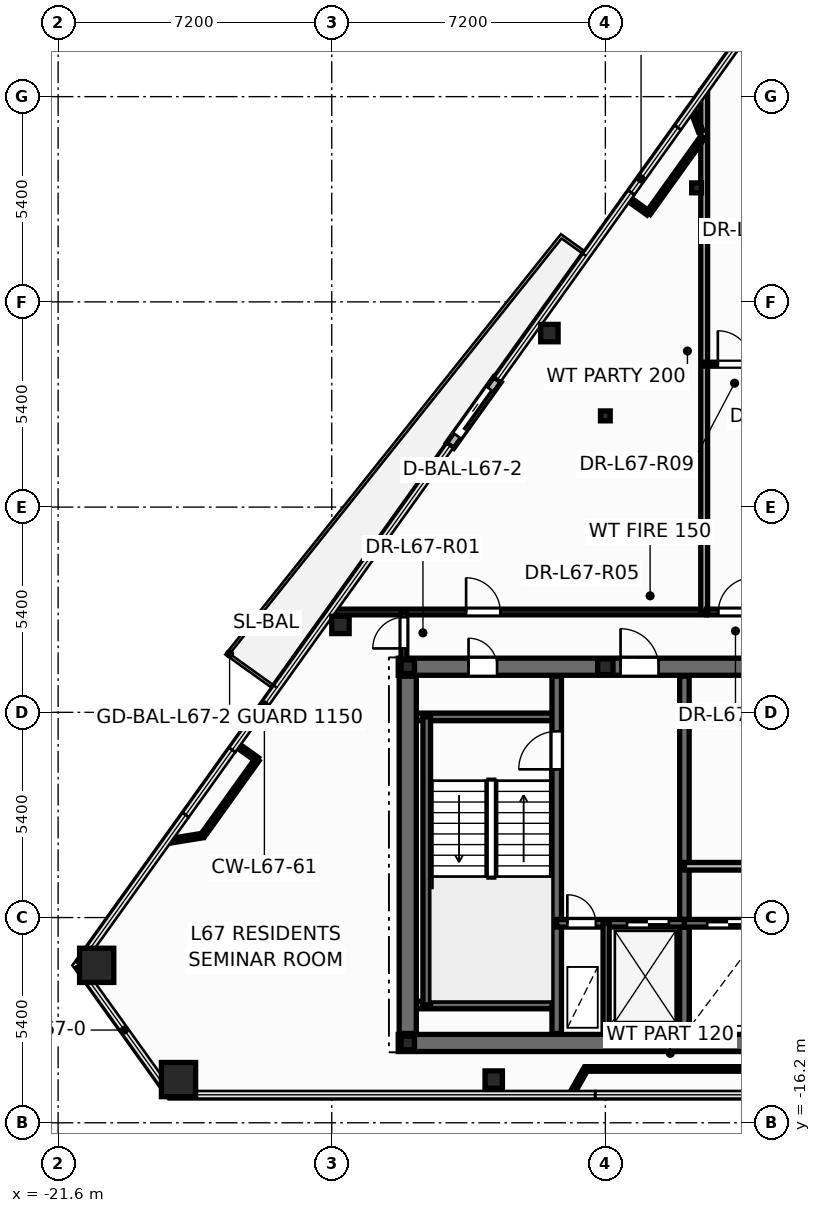
"""IFC4 building model, lengths in metres.
Left out: names, types, materials, properties, quantities, classifications, styles, units other than length and angle.
Written with IfcOpenShell. Run it as: python <this file> out.ifc"""

import sys

from ifc_helpers import new_model, si_unit, direction, frame, frame_2d, origin, origin_2d, place, context, subcontext, project, spatial, rectangle, hollow_rectangle, hollow_circle, i_section, extrude, element, fill, save


model = new_model("IFC4")
c1 = context("Model", 3, precision=1e-05, world=origin(), true_north=direction((0.0, 1.0)))
c2 = subcontext(c1, "Body", "Model", "MODEL_VIEW")
j1 = project(units=[si_unit("LENGTHUNIT", "METRE"), si_unit("PLANEANGLEUNIT", "RADIAN")], contexts=[c1])
p1 = place(None, origin())
s1 = spatial("IfcSite", under=j1, at=p1, CompositionType="ELEMENT")
p2 = place(p1, origin())
s2 = spatial("IfcBuilding", under=s1, at=p2, CompositionType="ELEMENT")
p3 = place(p2, frame((0.0, 0.0, 256.2)))
s3 = spatial("IfcBuildingStorey", under=s2, at=p3, CompositionType="ELEMENT", Elevation=256.2)
for number, where, z_axis, x_axis in (
    (1, (-20.585, -12.057, 0.0), (0.0, 0.0, 1.0), (1.0, 0.0, 0.0)),
    (2, (-18.432, -15.063, 0.0), (0.0, 0.0, 1.0), (1.0, 0.0, 0.0)),
):
    element("IfcColumn", number, at=place(p3, frame(where, z_axis=z_axis, x_axis=x_axis)), inside=s3, PredefinedType="COLUMN", context=c2, shape_type="SweptSolid", body=[
        extrude(hollow_rectangle(XDim=0.9, YDim=0.9, WallThickness=0.04, at=origin_2d()), origin(), (0.0, 0.0, 1.0), 3.6),
    ])
for number, where, z_axis, x_axis in (
    (3, (-10.138, -15.063, 0.0), (0.0, 0.0, 1.0), (1.0, 0.0, 0.0)),
    (4, (-8.673, 4.579, 0.0), (0.0, 0.0, 1.0), (1.0, 0.0, 0.0)),
    (5, (-14.171, -3.099, 0.0), (0.0, 0.0, 1.0), (1.0, 0.0, 0.0)),
):
    element("IfcColumn", number, at=place(p3, frame(where, z_axis=z_axis, x_axis=x_axis)), inside=s3, PredefinedType="COLUMN", context=c2, shape_type="SweptSolid", body=[
        extrude(hollow_circle(Radius=0.229, WallThickness=0.016, at=origin_2d()), origin(), (0.0, 0.0, 1.0), 3.6),
    ])
for number, where, z_axis, x_axis in (
    (6, (-12.4, -14.1, 0.0), (0.0, 0.0, 1.0), (1.0, 0.0, 0.0)),
    (7, (-12.4, -4.2, 0.0), (0.0, 0.0, 1.0), (1.0, 0.0, 0.0)),
):
    element("IfcColumn", number, at=place(p3, frame(where, z_axis=z_axis, x_axis=x_axis)), inside=s3, PredefinedType="COLUMN", context=c2, shape_type="SweptSolid", body=[
        extrude(i_section(OverallWidth=0.352, OverallDepth=0.359, WebThickness=0.018, FlangeThickness=0.026, at=origin_2d()), origin(), (0.0, 0.0, 1.0), 3.6),
    ])
p4 = place(p3, frame((-7.2, -4.2, 0.0), z_axis=(0.0, 0.0, 1.0), x_axis=(1.0, 0.0, 0.0)))
e8 = element("IfcColumn", 8, at=p4, inside=s3, PredefinedType="PILASTER", context=c2, shape_type="SweptSolid", body=[
    extrude(i_section(OverallWidth=0.405, OverallDepth=0.414, WebThickness=0.022, FlangeThickness=0.032, at=origin_2d()), origin(), (0.0, 0.0, 1.0), 3.6),
])
for number, where, z_axis, x_axis in (
    (9, (-7.2, 2.4, 0.0), (0.0, 0.0, 1.0), (1.0, 0.0, 0.0)),
    (10, (-4.8, 8.4, 0.0), (0.0, 0.0, 1.0), (1.0, 0.0, 0.0)),
):
    element("IfcColumn", number, at=place(p3, frame(where, z_axis=z_axis, x_axis=x_axis)), inside=s3, PredefinedType="COLUMN", context=c2, shape_type="SweptSolid", body=[
        extrude(i_section(OverallWidth=0.256, OverallDepth=0.26, WebThickness=0.01, FlangeThickness=0.017, at=origin_2d()), origin(), (0.0, 0.0, 1.0), 3.6),
    ])
p5 = place(p3, frame((-10.039, 3.357, -0.015), z_axis=(0.0, 0.0, 1.0), x_axis=(-0.58216589686, -0.813070026832, 0.0)))
e11 = element("IfcWall", 11, at=p5, inside=s3, PredefinedType="STANDARD", context=c2, shape_type="SweptSolid", body=[
    extrude(rectangle(XDim=2.14, YDim=0.24, at=frame_2d((1.07, 0.0))), origin(), (0.0, 0.0, 1.0), 2.878),
])
p6 = place(p5, frame((0.32, 0.0, 0.015)))
e12 = element("IfcOpeningElement", 12, at=p6, cuts=e11, PredefinedType="OPENING", context=c2, shape_type="SweptSolid", body=[
    extrude(rectangle(XDim=1.506, YDim=2.204, at=frame_2d((0.75, 1.102))), frame((0.0, 0.13, 0.0), z_axis=(0.0, -1.0, 0.0), x_axis=(1.0, 0.0, 0.0)), (0.0, 0.0, 1.0), 0.26),
])
p7 = place(p3, frame((-12.65, -14.1, 0.0), z_axis=(0.0, 0.0, 1.0), x_axis=(1.0, 0.0, 0.0)))
e13 = element("IfcWall", 13, at=p7, inside=s3, PredefinedType="SHEAR", context=c2, shape_type="SweptSolid", body=[
    extrude(rectangle(XDim=25.3, YDim=0.45, at=frame_2d((12.65, 0.0))), origin(), (0.0, 0.0, 1.0), 3.6),
])
p8 = place(p3, frame((-12.65, -4.2, 0.0), z_axis=(0.0, 0.0, 1.0), x_axis=(1.0, 0.0, 0.0)))
e14 = element("IfcWall", 14, at=p8, inside=s3, PredefinedType="SHEAR", context=c2, shape_type="SweptSolid", body=[
    extrude(rectangle(XDim=25.3, YDim=0.45, at=frame_2d((12.65, 0.0))), origin(), (0.0, 0.0, 1.0), 3.6),
])
p9 = place(p8, frame((1.85, 0.0, 0.0)))
e15 = element("IfcOpeningElement", 15, at=p9, cuts=e14, PredefinedType="OPENING", context=c2, shape_type="SweptSolid", body=[
    extrude(rectangle(XDim=0.756, YDim=2.054, at=frame_2d((0.375, 1.027))), frame((0.0, 0.235, 0.0), z_axis=(0.0, -1.0, 0.0), x_axis=(1.0, 0.0, 0.0)), (0.0, 0.0, 1.0), 0.47),
])
p10 = place(p8, frame((21.85, 0.0, 0.0)))
e16 = element("IfcOpeningElement", 16, at=p10, cuts=e14, PredefinedType="OPENING", context=c2, shape_type="SweptSolid", body=[
    extrude(rectangle(XDim=0.756, YDim=2.054, at=frame_2d((0.375, 1.027))), frame((0.0, 0.235, 0.0), z_axis=(0.0, -1.0, 0.0), x_axis=(1.0, 0.0, 0.0)), (0.0, 0.0, 1.0), 0.47),
])
p11 = place(p8, frame((23.5, 0.0, 0.0)))
e17 = element("IfcOpeningElement", 17, at=p11, cuts=e14, PredefinedType="OPENING", context=c2, shape_type="SweptSolid", body=[
    extrude(rectangle(XDim=0.756, YDim=2.054, at=frame_2d((0.375, 1.027))), frame((0.0, 0.235, 0.0), z_axis=(0.0, -1.0, 0.0), x_axis=(1.0, 0.0, 0.0)), (0.0, 0.0, 1.0), 0.47),
])
p12 = place(p8, frame((5.85, 0.0, 0.0)))
e18 = element("IfcOpeningElement", 18, at=p12, cuts=e14, PredefinedType="OPENING", context=c2, shape_type="SweptSolid", body=[
    extrude(rectangle(XDim=1.006, YDim=2.104, at=frame_2d((0.5, 1.052))), frame((0.0, 0.235, 0.0), z_axis=(0.0, -1.0, 0.0), x_axis=(1.0, 0.0, 0.0)), (0.0, 0.0, 1.0), 0.47),
])
p13 = place(p8, frame((10.35, 0.0, 0.0)))
e19 = element("IfcOpeningElement", 19, at=p13, cuts=e14, PredefinedType="OPENING", context=c2, shape_type="SweptSolid", body=[
    extrude(rectangle(XDim=1.406, YDim=2.154, at=frame_2d((0.7, 1.077))), frame((0.0, 0.235, 0.0), z_axis=(0.0, -1.0, 0.0), x_axis=(1.0, 0.0, 0.0)), (0.0, 0.0, 1.0), 0.47),
])
p14 = place(p8, frame((18.45, 0.0, 0.0)))
e20 = element("IfcOpeningElement", 20, at=p14, cuts=e14, PredefinedType="OPENING", context=c2, shape_type="SweptSolid", body=[
    extrude(rectangle(XDim=1.006, YDim=2.104, at=frame_2d((0.5, 1.052))), frame((0.0, 0.235, 0.0), z_axis=(0.0, -1.0, 0.0), x_axis=(1.0, 0.0, 0.0)), (0.0, 0.0, 1.0), 0.47),
])
for number, where, z_axis, x_axis in (
    (21, (-12.35, -5.52, 0.0), (0.0, 0.0, 1.0), (1.0, 0.0, 0.0)),
    (22, (-12.35, -13.1, 0.0), (0.0, 0.0, 1.0), (1.0, 0.0, 0.0)),
):
    element("IfcWall", number, at=place(p3, frame(where, z_axis=z_axis, x_axis=x_axis)), inside=s3, PredefinedType="SOLIDWALL", context=c2, shape_type="SweptSolid", body=[
        extrude(rectangle(XDim=3.87, YDim=0.2, at=frame_2d((1.935, 0.0))), origin(), (0.0, 0.0, 1.0), 3.6),
    ])
p15 = place(p3, frame((-11.9, -13.1, 0.0), z_axis=(0.0, 0.0, 1.0), x_axis=(0.0, 1.0, 0.0)))
e23 = element("IfcWall", 23, at=p15, inside=s3, PredefinedType="SOLIDWALL", context=c2, shape_type="SweptSolid", body=[
    extrude(rectangle(XDim=7.58, YDim=0.2, at=frame_2d((3.79, 0.0))), origin(), (0.0, 0.0, 1.0), 3.6),
])
p16 = place(p3, frame((-8.48, -13.85, 0.0), z_axis=(0.0, 0.0, 1.0), x_axis=(0.0, 1.0, 0.0)))
e24 = element("IfcWall", 24, at=p16, inside=s3, PredefinedType="SHEAR", context=c2, shape_type="SweptSolid", body=[
    extrude(rectangle(XDim=9.4, YDim=0.25, at=frame_2d((4.7, 0.0))), origin(), (0.0, 0.0, 1.0), 3.6),
])
p17 = place(p16, frame((6.95, 0.0, 0.0)))
e25 = element("IfcOpeningElement", 25, at=p17, cuts=e24, PredefinedType="OPENING", context=c2, shape_type="SweptSolid", body=[
    extrude(rectangle(XDim=1.006, YDim=2.104, at=frame_2d((0.5, 1.052))), frame((0.0, 0.135, 0.0), z_axis=(0.0, -1.0, 0.0), x_axis=(1.0, 0.0, 0.0)), (0.0, 0.0, 1.0), 0.27),
])
p18 = place(p3, frame((-5.12, -13.85, 0.0), z_axis=(0.0, 0.0, 1.0), x_axis=(0.0, 1.0, 0.0)))
e26 = element("IfcWall", 26, at=p18, inside=s3, PredefinedType="SHEAR", context=c2, shape_type="SweptSolid", body=[
    extrude(rectangle(XDim=9.4, YDim=0.25, at=frame_2d((4.7, 0.0))), origin(), (0.0, 0.0, 1.0), 3.6),
])
p19 = place(p3, frame((-8.48, -10.95, 0.0), z_axis=(0.0, 0.0, 1.0), x_axis=(1.0, 0.0, 0.0)))
e27 = element("IfcWall", 27, at=p19, inside=s3, PredefinedType="SOLIDWALL", context=c2, shape_type="SweptSolid", body=[
    extrude(rectangle(XDim=3.36, YDim=0.2, at=frame_2d((1.68, 0.0))), origin(), (0.0, 0.0, 1.0), 3.6),
])
p20 = place(p19, frame((0.28, 0.0, 0.0)))
e28 = element("IfcOpeningElement", 28, at=p20, cuts=e27, PredefinedType="OPENING", context=c2, shape_type="SweptSolid", body=[
    extrude(rectangle(XDim=0.756, YDim=2.054, at=frame_2d((0.375, 1.027))), frame((0.0, 0.11, 0.0), z_axis=(0.0, -1.0, 0.0), x_axis=(1.0, 0.0, 0.0)), (0.0, 0.0, 1.0), 0.22),
])
p21 = place(p19, frame((1.85, 0.0, 0.0)))
e29 = element("IfcOpeningElement", 29, at=p21, cuts=e27, PredefinedType="OPENING", context=c2, shape_type="SweptSolid", body=[
    extrude(rectangle(XDim=1.106, YDim=2.104, at=frame_2d((0.55, 1.052))), frame((0.0, 0.11, 0.0), z_axis=(0.0, -1.0, 0.0), x_axis=(1.0, 0.0, 0.0)), (0.0, 0.0, 1.0), 0.22),
])
p22 = place(p3, frame((-5.12, -10.95, 0.0), z_axis=(0.0, 0.0, 1.0), x_axis=(1.0, 0.0, 0.0)))
e30 = element("IfcWall", 30, at=p22, inside=s3, PredefinedType="SOLIDWALL", context=c2, shape_type="SweptSolid", body=[
    extrude(rectangle(XDim=10.24, YDim=0.2, at=frame_2d((5.12, 0.0))), origin(), (0.0, 0.0, 1.0), 3.6),
])
p23 = place(p22, frame((0.6, 0.0, 0.0)))
e31 = element("IfcOpeningElement", 31, at=p23, cuts=e30, PredefinedType="OPENING", context=c2, shape_type="SweptSolid", body=[
    extrude(rectangle(XDim=1.106, YDim=2.104, at=frame_2d((0.55, 1.052))), frame((0.0, 0.11, 0.0), z_axis=(0.0, -1.0, 0.0), x_axis=(1.0, 0.0, 0.0)), (0.0, 0.0, 1.0), 0.22),
])
p24 = place(p22, frame((2.67, 0.0, 0.0)))
e32 = element("IfcOpeningElement", 32, at=p24, cuts=e30, PredefinedType="OPENING", context=c2, shape_type="SweptSolid", body=[
    extrude(rectangle(XDim=1.106, YDim=2.104, at=frame_2d((0.55, 1.052))), frame((0.0, 0.11, 0.0), z_axis=(0.0, -1.0, 0.0), x_axis=(1.0, 0.0, 0.0)), (0.0, 0.0, 1.0), 0.22),
])
p25 = place(p22, frame((4.57, 0.0, 0.0)))
e33 = element("IfcOpeningElement", 33, at=p25, cuts=e30, PredefinedType="OPENING", context=c2, shape_type="SweptSolid", body=[
    extrude(rectangle(XDim=1.106, YDim=2.104, at=frame_2d((0.55, 1.052))), frame((0.0, 0.11, 0.0), z_axis=(0.0, -1.0, 0.0), x_axis=(1.0, 0.0, 0.0)), (0.0, 0.0, 1.0), 0.22),
])
p26 = place(p22, frame((6.47, 0.0, 0.0)))
e34 = element("IfcOpeningElement", 34, at=p26, cuts=e30, PredefinedType="OPENING", context=c2, shape_type="SweptSolid", body=[
    extrude(rectangle(XDim=1.106, YDim=2.104, at=frame_2d((0.55, 1.052))), frame((0.0, 0.11, 0.0), z_axis=(0.0, -1.0, 0.0), x_axis=(1.0, 0.0, 0.0)), (0.0, 0.0, 1.0), 0.22),
])
p27 = place(p22, frame((8.54, 0.0, 0.0)))
e35 = element("IfcOpeningElement", 35, at=p27, cuts=e30, PredefinedType="OPENING", context=c2, shape_type="SweptSolid", body=[
    extrude(rectangle(XDim=1.106, YDim=2.104, at=frame_2d((0.55, 1.052))), frame((0.0, 0.11, 0.0), z_axis=(0.0, -1.0, 0.0), x_axis=(1.0, 0.0, 0.0)), (0.0, 0.0, 1.0), 0.22),
])
p28 = place(p3, frame((-7.18, -13.85, 0.0), z_axis=(0.0, 0.0, 1.0), x_axis=(0.0, 1.0, 0.0)))
e36 = element("IfcWall", 36, at=p28, inside=s3, PredefinedType="PARTITIONING", context=c2, shape_type="SweptSolid", body=[
    extrude(rectangle(XDim=2.9, YDim=0.16, at=frame_2d((1.45, 0.0))), origin(), (0.0, 0.0, 1.0), 2.57),
])
p29 = place(p3, frame((-12.4, -13.85, 0.0), z_axis=(0.0, 0.0, 1.0), x_axis=(0.0, 1.0, 0.0)))
e37 = element("IfcWall", 37, at=p29, inside=s3, PredefinedType="SHEAR", context=c2, shape_type="SweptSolid", body=[
    extrude(rectangle(XDim=9.4, YDim=0.45, at=frame_2d((4.7, 0.0))), origin(), (0.0, 0.0, 1.0), 3.6),
])
p30 = place(p3, frame((-5.12, -9.45, 0.0), z_axis=(0.0, 0.0, 1.0), x_axis=(1.0, 0.0, 0.0)))
e38 = element("IfcWall", 38, at=p30, inside=s3, PredefinedType="SOLIDWALL", context=c2, shape_type="SweptSolid", body=[
    extrude(rectangle(XDim=2.24, YDim=0.2, at=frame_2d((1.12, 0.0))), origin(), (0.0, 0.0, 1.0), 3.345),
])
p31 = place(p3, frame((-14.42, -2.76, 0.0), z_axis=(0.0, 0.0, 1.0), x_axis=(1.0, 0.0, 0.0)))
e39 = element("IfcWall", 39, at=p31, inside=s3, PredefinedType="PARTITIONING", context=c2, shape_type="SweptSolid", body=[
    extrude(rectangle(XDim=9.88, YDim=0.15, at=frame_2d((4.94, 0.0))), origin(), (0.0, 0.0, 1.0), 2.32),
])
p32 = place(p31, frame((3.555, 0.0, 0.0)))
e40 = element("IfcOpeningElement", 40, at=p32, cuts=e39, PredefinedType="OPENING", context=c2, shape_type="SweptSolid", body=[
    extrude(rectangle(XDim=0.906, YDim=2.104, at=frame_2d((0.45, 1.052))), frame((0.0, 0.085, 0.0), z_axis=(0.0, -1.0, 0.0), x_axis=(1.0, 0.0, 0.0)), (0.0, 0.0, 1.0), 0.17),
])
p33 = place(p3, frame((-4.6, -2.74, 0.0), z_axis=(0.0, 0.0, 1.0), x_axis=(0.0, 1.0, 0.0)))
e41 = element("IfcWall", 41, at=p33, inside=s3, PredefinedType="PARTITIONING", context=c2, shape_type="SweptSolid", body=[
    extrude(rectangle(XDim=13.693, YDim=0.18, at=frame_2d((6.847, 0.0))), origin(), (0.0, 0.0, 1.0), 2.32),
])
p34 = place(p3, frame((-7.715, -14.783, 0.0), z_axis=(0.0, 0.0, 1.0), x_axis=(1.0, 0.0, 0.0)))
e42 = element("IfcWall", 42, at=p34, inside=s3, PredefinedType="PARTITIONING", context=c2, shape_type="SweptSolid", body=[
    extrude(rectangle(XDim=4.445, YDim=0.12, at=frame_2d((2.223, 0.0))), origin(), (0.0, 0.0, 1.0), 3.345),
])
p35 = place(p3, frame((-4.538, -2.76, 0.0), z_axis=(0.0, 0.0, 1.0), x_axis=(1.0, 0.0, 0.0)))
e43 = element("IfcWall", 43, at=p35, inside=s3, PredefinedType="PARTITIONING", context=c2, shape_type="SweptSolid", body=[
    extrude(rectangle(XDim=3.098, YDim=0.15, at=frame_2d((1.549, 0.0))), origin(), (0.0, 0.0, 1.0), 2.964),
])
p36 = place(p35, frame((0.312, 0.0, 0.0)))
e44 = element("IfcOpeningElement", 44, at=p36, cuts=e43, PredefinedType="OPENING", context=c2, shape_type="SweptSolid", body=[
    extrude(rectangle(XDim=0.906, YDim=2.104, at=frame_2d((0.45, 1.052))), frame((0.0, 0.085, 0.0), z_axis=(0.0, -1.0, 0.0), x_axis=(1.0, 0.0, 0.0)), (0.0, 0.0, 1.0), 0.17),
])
p37 = place(p3, frame((-4.6, 3.76, 0.0), z_axis=(0.0, 0.0, 1.0), x_axis=(1.0, 0.0, 0.0)))
e45 = element("IfcWall", 45, at=p37, inside=s3, PredefinedType="PARTITIONING", context=c2, shape_type="SweptSolid", body=[
    extrude(rectangle(XDim=2.6, YDim=0.105, at=frame_2d((1.3, 0.0))), origin(), (0.0, 0.0, 1.0), 2.964),
])
p38 = place(p37, frame((0.36, 0.0, 0.0)))
e46 = element("IfcOpeningElement", 46, at=p38, cuts=e45, PredefinedType="OPENING", context=c2, shape_type="SweptSolid", body=[
    extrude(rectangle(XDim=0.886, YDim=2.104, at=frame_2d((0.44, 1.052))), frame((0.0, 0.062, 0.0), z_axis=(0.0, -1.0, 0.0), x_axis=(1.0, 0.0, 0.0)), (0.0, 0.0, 1.0), 0.125),
])
for number, where, z_axis, x_axis in (
    (47, (-16.362, -6.64, 0.0), (0.0, 0.0, 1.0), (-0.582, -0.813, 0.0)),
    (48, (-4.635, 9.736, 0.0), (0.0, 0.0, 1.0), (-0.582, -0.813, 0.0)),
):
    element("IfcWall", number, at=place(p3, frame(where, z_axis=z_axis, x_axis=x_axis)), inside=s3, PredefinedType="PARTITIONING", context=c2, shape_type="SweptSolid", body=[
        extrude(rectangle(XDim=2.461, YDim=0.12, at=frame_2d((1.23, 0.0))), origin(), (0.0, 0.0, 1.0), 3.345),
    ])
p39 = place(p3, frame((-12.5, -4.24, 0.0), z_axis=(0.0, 0.0, 1.0), x_axis=(0.0, 1.0, 0.0)))
e49 = element("IfcWall", 49, at=p39, inside=s3, PredefinedType="PARTITIONING", context=c2, shape_type="SweptSolid", body=[
    extrude(rectangle(XDim=1.48, YDim=0.15, at=frame_2d((0.74, 0.0))), origin(), (0.0, 0.0, 1.0), 2.32),
])
p40 = place(p39, frame((0.522, 0.0, 0.0)))
e50 = element("IfcOpeningElement", 50, at=p40, cuts=e49, PredefinedType="OPENING", context=c2, shape_type="SweptSolid", body=[
    extrude(rectangle(XDim=0.826, YDim=2.104, at=frame_2d((0.41, 1.052))), frame((0.0, 0.085, 0.0), z_axis=(0.0, -1.0, 0.0), x_axis=(1.0, 0.0, 0.0)), (0.0, 0.0, 1.0), 0.17),
])
p41 = place(p3, frame((-17.795, -8.641, 0.0), z_axis=(0.0, 0.0, 1.0), x_axis=(-0.987008329949, -0.160669090402, 0.0)))
e51 = element("IfcWall", 51, at=p41, inside=s3, PredefinedType="PARTITIONING", context=c2, shape_type="SweptSolid", body=[
    extrude(rectangle(XDim=0.849, YDim=0.12, at=frame_2d((0.425, 0.0))), origin(), (0.0, 0.0, 1.0), 2.863),
])
p42 = place(p3, frame((-4.92, 10.489, 0.0), z_axis=(0.0, 0.0, 1.0), x_axis=(0.35415177854, -0.935187958518, 0.0)))
e52 = element("IfcWall", 52, at=p42, inside=s3, PredefinedType="PARTITIONING", context=c2, shape_type="SweptSolid", body=[
    extrude(rectangle(XDim=0.645, YDim=0.12, at=frame_2d((0.322, 0.0))), origin(), (0.0, 0.0, 1.0), 2.863),
])
p43 = place(p3, frame((-8.095, -15.453, 0.0), z_axis=(0.0, 0.0, 1.0), x_axis=(0.494091029217, 0.869410176411, 0.0)))
e53 = element("IfcWall", 53, at=p43, inside=s3, PredefinedType="PARTITIONING", context=c2, shape_type="SweptSolid", body=[
    extrude(rectangle(XDim=0.771, YDim=0.12, at=frame_2d((0.385, 0.0))), origin(), (0.0, 0.0, 1.0), 2.863),
])
for number, where, z_axis, x_axis in (
    (54, (-16.907, -6.25, 0.0), (0.0, 0.0, 1.0), (0.813, -0.582, 0.0)),
    (55, (-6.068, 7.735, 0.0), (0.0, 0.0, 1.0), (-0.813, 0.582, 0.0)),
):
    element("IfcWall", number, at=place(p3, frame(where, z_axis=z_axis, x_axis=x_axis)), inside=s3, PredefinedType="PARTITIONING", context=c2, shape_type="SweptSolid", body=[
        extrude(rectangle(XDim=0.67, YDim=0.12, at=frame_2d((0.335, 0.0))), origin(), (0.0, 0.0, 1.0), 2.863),
    ])
p44 = place(p6, origin())
e56 = element("IfcDoor", 56, at=p44, inside=s3, OperationType="SLIDING_TO_RIGHT", PredefinedType="DOOR", context=c2, shape_type="SweptSolid", body=[
    extrude(rectangle(XDim=1.5, YDim=2.2, at=frame_2d((0.75, 1.1))), frame((0.0, 0.025, 0.0), z_axis=(0.0, -1.0, 0.0), x_axis=(1.0, 0.0, 0.0)), (0.0, 0.0, 1.0), 0.05),
])
fill(e12, e56)
p45 = place(p17, origin())
e57 = element("IfcDoor", 57, at=p45, inside=s3, OperationType="SINGLE_SWING_LEFT", PredefinedType="DOOR", context=c2, shape_type="SweptSolid", body=[
    extrude(rectangle(XDim=1.0, YDim=2.1, at=frame_2d((0.5, 1.05))), frame((0.0, 0.025, 0.0), z_axis=(0.0, -1.0, 0.0), x_axis=(1.0, 0.0, 0.0)), (0.0, 0.0, 1.0), 0.05),
])
fill(e25, e57)
p46 = place(p20, origin())
e58 = element("IfcDoor", 58, at=p46, inside=s3, OperationType="SINGLE_SWING_LEFT", PredefinedType="DOOR", context=c2, shape_type="SweptSolid", body=[
    extrude(rectangle(XDim=0.75, YDim=2.05, at=frame_2d((0.375, 1.025))), frame((0.0, 0.025, 0.0), z_axis=(0.0, -1.0, 0.0), x_axis=(1.0, 0.0, 0.0)), (0.0, 0.0, 1.0), 0.05),
])
fill(e28, e58)
p47 = place(p21, origin())
e59 = element("IfcDoor", 59, at=p47, inside=s3, OperationType="DOUBLE_DOOR_SLIDING", PredefinedType="DOOR", context=c2, shape_type="SweptSolid", body=[
    extrude(rectangle(XDim=1.1, YDim=2.1, at=frame_2d((0.55, 1.05))), frame((0.0, 0.025, 0.0), z_axis=(0.0, -1.0, 0.0), x_axis=(1.0, 0.0, 0.0)), (0.0, 0.0, 1.0), 0.05),
])
fill(e29, e59)
p48 = place(p23, origin())
e60 = element("IfcDoor", 60, at=p48, inside=s3, OperationType="DOUBLE_DOOR_SLIDING", PredefinedType="DOOR", context=c2, shape_type="SweptSolid", body=[
    extrude(rectangle(XDim=1.1, YDim=2.1, at=frame_2d((0.55, 1.05))), frame((0.0, 0.025, 0.0), z_axis=(0.0, -1.0, 0.0), x_axis=(1.0, 0.0, 0.0)), (0.0, 0.0, 1.0), 0.05),
])
fill(e31, e60)
p49 = place(p9, origin())
e61 = element("IfcDoor", 61, at=p49, inside=s3, OperationType="SINGLE_SWING_LEFT", PredefinedType="DOOR", context=c2, shape_type="SweptSolid", body=[
    extrude(rectangle(XDim=0.75, YDim=2.05, at=frame_2d((0.375, 1.025))), frame((0.0, 0.025, 0.0), z_axis=(0.0, -1.0, 0.0), x_axis=(1.0, 0.0, 0.0)), (0.0, 0.0, 1.0), 0.05),
])
fill(e15, e61)
p50 = place(p12, origin())
e62 = element("IfcDoor", 62, at=p50, inside=s3, OperationType="SINGLE_SWING_LEFT", PredefinedType="DOOR", context=c2, shape_type="SweptSolid", body=[
    extrude(rectangle(XDim=1.0, YDim=2.1, at=frame_2d((0.5, 1.05))), frame((0.0, 0.025, 0.0), z_axis=(0.0, -1.0, 0.0), x_axis=(1.0, 0.0, 0.0)), (0.0, 0.0, 1.0), 0.05),
])
fill(e18, e62)
p51 = place(p40, origin())
e63 = element("IfcDoor", 63, at=p51, inside=s3, OperationType="SINGLE_SWING_LEFT", PredefinedType="DOOR", context=c2, shape_type="SweptSolid", body=[
    extrude(rectangle(XDim=0.82, YDim=2.1, at=frame_2d((0.41, 1.05))), frame((0.0, 0.025, 0.0), z_axis=(0.0, -1.0, 0.0), x_axis=(1.0, 0.0, 0.0)), (0.0, 0.0, 1.0), 0.05),
])
fill(e50, e63)
p52 = place(p32, origin())
e64 = element("IfcDoor", 64, at=p52, inside=s3, OperationType="SINGLE_SWING_LEFT", PredefinedType="DOOR", context=c2, shape_type="SweptSolid", body=[
    extrude(rectangle(XDim=0.9, YDim=2.1, at=frame_2d((0.45, 1.05))), frame((0.0, 0.025, 0.0), z_axis=(0.0, -1.0, 0.0), x_axis=(1.0, 0.0, 0.0)), (0.0, 0.0, 1.0), 0.05),
])
fill(e40, e64)
p53 = place(p36, origin())
e65 = element("IfcDoor", 65, at=p53, inside=s3, OperationType="SINGLE_SWING_RIGHT", PredefinedType="DOOR", context=c2, shape_type="SweptSolid", body=[
    extrude(rectangle(XDim=0.9, YDim=2.1, at=frame_2d((0.45, 1.05))), frame((0.0, 0.025, 0.0), z_axis=(0.0, -1.0, 0.0), x_axis=(1.0, 0.0, 0.0)), (0.0, 0.0, 1.0), 0.05),
])
fill(e44, e65)
p54 = place(p38, origin())
e66 = element("IfcDoor", 66, at=p54, inside=s3, OperationType="SINGLE_SWING_LEFT", PredefinedType="DOOR", context=c2, shape_type="SweptSolid", body=[
    extrude(rectangle(XDim=0.88, YDim=2.1, at=frame_2d((0.44, 1.05))), frame((0.0, 0.025, 0.0), z_axis=(0.0, -1.0, 0.0), x_axis=(1.0, 0.0, 0.0)), (0.0, 0.0, 1.0), 0.05),
])
fill(e46, e66)
save(model, sys.argv[1])
